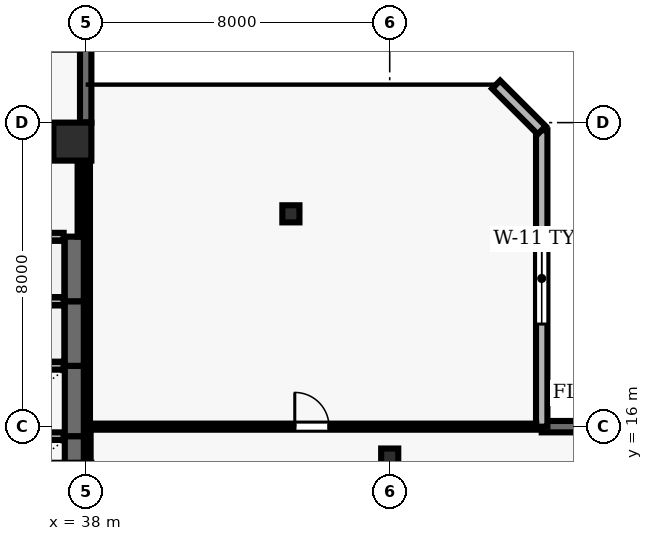
"""IFC4 building model, lengths in metres.
Left out: names, types, materials, properties, quantities, classifications, styles, units other than length and angle.
Written with IfcOpenShell. Run it as: python <this file> out.ifc"""

import sys

from ifc_helpers import new_model, si_unit, direction, frame, frame_2d, origin, origin_2d, place, context, subcontext, project, spatial, rectangle, hollow_rectangle, extrude, element, fill, save


model = new_model("IFC4")
c1 = context("Model", 3, precision=1e-05, world=origin(), true_north=direction((0.0, 1.0)))
c2 = subcontext(c1, "Body", "Model", "MODEL_VIEW")
j1 = project(units=[si_unit("LENGTHUNIT", "METRE"), si_unit("PLANEANGLEUNIT", "RADIAN")], contexts=[c1])
p1 = place(None, origin())
s1 = spatial("IfcSite", under=j1, at=p1, CompositionType="ELEMENT")
p2 = place(p1, origin())
s2 = spatial("IfcBuilding", under=s1, at=p2, CompositionType="ELEMENT")
p3 = place(p2, frame((0.0, 0.0, 170.8)))
s3 = spatial("IfcBuildingStorey", under=s2, at=p3, CompositionType="ELEMENT", Elevation=170.8)
p4 = place(p3, frame((37.65, 23.5, 0.0), z_axis=(0.0, 0.0, 1.0), x_axis=(1.0, 0.0, 0.0)))
e1 = element("IfcColumn", 1, at=p4, inside=s3, PredefinedType="COLUMN", context=c2, shape_type="SweptSolid", body=[
    extrude(rectangle(XDim=1.0, YDim=1.0, at=origin_2d()), origin(), (0.0, 0.0, 1.0), 5.0),
])
for number, where, z_axis, x_axis in (
    (2, (46.0, 15.2, 0.0), (0.0, 0.0, 1.0), (1.0, 0.0, 0.0)),
    (3, (43.4, 21.6, 0.0), (0.0, 0.0, 1.0), (1.0, 0.0, 0.0)),
):
    element("IfcColumn", number, at=place(p3, frame(where, z_axis=z_axis, x_axis=x_axis)), inside=s3, PredefinedType="COLUMN", context=c2, shape_type="SweptSolid", body=[
        extrude(hollow_rectangle(XDim=0.45, YDim=0.45, WallThickness=0.02, at=origin_2d()), origin(), (0.0, 0.0, 1.0), 5.0),
    ])
p5 = place(p3, frame((62.7, 16.0, 0.0), z_axis=(0.0, 0.0, 1.0), x_axis=(-1.0, 0.0, 0.0)))
e4 = element("IfcWall", 4, at=p5, inside=s3, PredefinedType="SOLIDWALL", context=c2, shape_type="SweptSolid", body=[
    extrude(rectangle(XDim=12.7, YDim=0.3, at=frame_2d((6.35, 0.0))), origin(), (0.0, 0.0, 1.0), 4.79),
])
p6 = place(p5, frame((6.85, 0.0, 0.0)))
e5 = element("IfcOpeningElement", 5, at=p6, cuts=e4, PredefinedType="OPENING", context=c2, shape_type="SweptSolid", body=[
    extrude(rectangle(XDim=1.0, YDim=2.2, at=frame_2d((0.5, 1.1))), frame((0.0, 0.16, 0.0), z_axis=(0.0, -1.0, 0.0), x_axis=(1.0, 0.0, 0.0)), (0.0, 0.0, 1.0), 0.32),
])
p7 = place(p5, frame((2.275, 0.0, 0.9)))
e6 = element("IfcOpeningElement", 6, at=p7, cuts=e4, PredefinedType="OPENING", context=c2, shape_type="SweptSolid", body=[
    extrude(rectangle(XDim=1.8, YDim=2.2, at=frame_2d((0.9, 1.1))), frame((0.0, 0.16, 0.0), z_axis=(0.0, -1.0, 0.0), x_axis=(1.0, 0.0, 0.0)), (0.0, 0.0, 1.0), 0.32),
])
p8 = place(p3, frame((50.0, 16.0, 0.0), z_axis=(0.0, 0.0, 1.0), x_axis=(0.0, 1.0, 0.0)))
e7 = element("IfcWall", 7, at=p8, inside=s3, PredefinedType="SOLIDWALL", context=c2, shape_type="SweptSolid", body=[
    extrude(rectangle(XDim=7.8, YDim=0.3, at=frame_2d((3.9, 0.0))), origin(), (0.0, 0.0, 1.0), 4.79),
])
p9 = place(p8, frame((2.7, 0.0, 0.9)))
e8 = element("IfcOpeningElement", 8, at=p9, cuts=e7, PredefinedType="OPENING", context=c2, shape_type="SweptSolid", body=[
    extrude(rectangle(XDim=2.4, YDim=2.2, at=frame_2d((1.2, 1.1))), frame((0.0, 0.16, 0.0), z_axis=(0.0, -1.0, 0.0), x_axis=(1.0, 0.0, 0.0)), (0.0, 0.0, 1.0), 0.32),
])
p10 = place(p3, frame((50.0, 23.8, 0.0), z_axis=(0.0, 0.0, 1.0), x_axis=(-0.707106781187, 0.707106781187, 0.0)))
e9 = element("IfcWall", 9, at=p10, inside=s3, PredefinedType="SOLIDWALL", context=c2, shape_type="SweptSolid", body=[
    extrude(rectangle(XDim=1.697, YDim=0.3, at=frame_2d((0.849, 0.0))), origin(), (0.0, 0.0, 1.0), 4.79),
])
p11 = place(p3, frame((38.0, 24.0, 0.0), z_axis=(0.0, 0.0, 1.0), x_axis=(0.0, 1.0, 0.0)))
e10 = element("IfcWall", 10, at=p11, inside=s3, PredefinedType="SOLIDWALL", context=c2, shape_type="SweptSolid", body=[
    extrude(rectangle(XDim=16.7, YDim=0.3, at=frame_2d((8.35, 0.0))), origin(), (0.0, 0.0, 1.0), 4.79),
])
p12 = place(p11, frame((7.45, 0.0, 0.0)))
e11 = element("IfcOpeningElement", 11, at=p12, cuts=e10, PredefinedType="OPENING", context=c2, shape_type="SweptSolid", body=[
    extrude(rectangle(XDim=1.0, YDim=2.2, at=frame_2d((0.5, 1.1))), frame((0.0, 0.16, 0.0), z_axis=(0.0, -1.0, 0.0), x_axis=(1.0, 0.0, 0.0)), (0.0, 0.0, 1.0), 0.32),
])
p13 = place(p11, frame((2.725, 0.0, 0.9)))
e12 = element("IfcOpeningElement", 12, at=p13, cuts=e10, PredefinedType="OPENING", context=c2, shape_type="SweptSolid", body=[
    extrude(rectangle(XDim=1.5, YDim=1.6, at=frame_2d((0.75, 0.8))), frame((0.0, 0.16, 0.0), z_axis=(0.0, -1.0, 0.0), x_axis=(1.0, 0.0, 0.0)), (0.0, 0.0, 1.0), 0.32),
])
p14 = place(p11, frame((11.475, 0.0, 0.9)))
e13 = element("IfcOpeningElement", 13, at=p14, cuts=e10, PredefinedType="OPENING", context=c2, shape_type="SweptSolid", body=[
    extrude(rectangle(XDim=1.5, YDim=1.6, at=frame_2d((0.75, 0.8))), frame((0.0, 0.16, 0.0), z_axis=(0.0, -1.0, 0.0), x_axis=(1.0, 0.0, 0.0)), (0.0, 0.0, 1.0), 0.32),
])
p15 = place(p3, frame((37.7, 13.9, 0.0), z_axis=(0.0, 0.0, 1.0), x_axis=(0.0, 1.0, 0.0)))
e14 = element("IfcWall", 14, at=p15, inside=s3, PredefinedType="SHEAR", context=c2, shape_type="SweptSolid", body=[
    extrude(rectangle(XDim=1.85, YDim=0.5, at=frame_2d((0.925, 0.0))), origin(), (0.0, 0.0, 1.0), 4.79),
])
p16 = place(p3, frame((37.42, 15.75, 0.0), z_axis=(0.0, 0.0, 1.0), x_axis=(-1.0, 0.0, 0.0)))
e15 = element("IfcWall", 15, at=p16, inside=s3, PredefinedType="SOLIDWALL", context=c2, shape_type="SweptSolid", body=[
    extrude(rectangle(XDim=2.14, YDim=0.2, at=frame_2d((1.07, 0.0))), origin(), (0.0, 0.0, 1.0), 4.79),
])
p17 = place(p3, frame((37.7, 15.75, 0.0), z_axis=(0.0, 0.0, 1.0), x_axis=(0.0, 1.0, 0.0)))
e16 = element("IfcWall", 16, at=p17, inside=s3, PredefinedType="SHEAR", context=c2, shape_type="SweptSolid", body=[
    extrude(rectangle(XDim=1.85, YDim=0.5, at=frame_2d((0.925, 0.0))), origin(), (0.0, 0.0, 1.0), 4.79),
])
p18 = place(p3, frame((37.42, 17.6, 0.0), z_axis=(0.0, 0.0, 1.0), x_axis=(-1.0, 0.0, 0.0)))
e17 = element("IfcWall", 17, at=p18, inside=s3, PredefinedType="SOLIDWALL", context=c2, shape_type="SweptSolid", body=[
    extrude(rectangle(XDim=2.14, YDim=0.2, at=frame_2d((1.07, 0.0))), origin(), (0.0, 0.0, 1.0), 4.79),
])
p19 = place(p3, frame((37.7, 17.6, 0.0), z_axis=(0.0, 0.0, 1.0), x_axis=(0.0, 1.0, 0.0)))
e18 = element("IfcWall", 18, at=p19, inside=s3, PredefinedType="SHEAR", context=c2, shape_type="SweptSolid", body=[
    extrude(rectangle(XDim=1.7, YDim=0.5, at=frame_2d((0.85, 0.0))), origin(), (0.0, 0.0, 1.0), 4.79),
])
p20 = place(p3, frame((37.42, 19.3, 0.0), z_axis=(0.0, 0.0, 1.0), x_axis=(-1.0, 0.0, 0.0)))
e19 = element("IfcWall", 19, at=p20, inside=s3, PredefinedType="SOLIDWALL", context=c2, shape_type="SweptSolid", body=[
    extrude(rectangle(XDim=2.14, YDim=0.2, at=frame_2d((1.07, 0.0))), origin(), (0.0, 0.0, 1.0), 4.79),
])
p21 = place(p3, frame((37.7, 19.3, 0.0), z_axis=(0.0, 0.0, 1.0), x_axis=(0.0, 1.0, 0.0)))
e20 = element("IfcWall", 20, at=p21, inside=s3, PredefinedType="SHEAR", context=c2, shape_type="SweptSolid", body=[
    extrude(rectangle(XDim=1.7, YDim=0.5, at=frame_2d((0.85, 0.0))), origin(), (0.0, 0.0, 1.0), 4.79),
])
p22 = place(p3, frame((37.42, 21.0, 0.0), z_axis=(0.0, 0.0, 1.0), x_axis=(-1.0, 0.0, 0.0)))
e21 = element("IfcWall", 21, at=p22, inside=s3, PredefinedType="SOLIDWALL", context=c2, shape_type="SweptSolid", body=[
    extrude(rectangle(XDim=2.14, YDim=0.2, at=frame_2d((1.07, 0.0))), origin(), (0.0, 0.0, 1.0), 4.79),
])
p23 = place(p3, frame((37.85, 23.85, 0.0), z_axis=(0.0, 0.0, 1.0), x_axis=(-1.0, 0.0, 0.0)))
e22 = element("IfcWall", 22, at=p23, inside=s3, PredefinedType="PARTITIONING", context=c2, shape_type="SweptSolid", body=[
    extrude(rectangle(XDim=4.0, YDim=0.16, at=frame_2d((2.0, 0.0))), origin(), (0.0, 0.0, 1.0), 4.246),
])
p24 = place(p23, frame((2.25, 0.0, 0.0)))
e23 = element("IfcOpeningElement", 23, at=p24, cuts=e22, PredefinedType="OPENING", context=c2, shape_type="SweptSolid", body=[
    extrude(rectangle(XDim=0.9, YDim=2.1, at=frame_2d((0.45, 1.05))), frame((0.0, 0.09, 0.0), z_axis=(0.0, -1.0, 0.0), x_axis=(1.0, 0.0, 0.0)), (0.0, 0.0, 1.0), 0.18),
])
p25 = place(p3, frame((38.05, 16.0, 0.0), z_axis=(0.0, 0.0, 1.0), x_axis=(1.0, 0.0, 0.0)))
e24 = element("IfcWall", 24, at=p25, inside=s3, PredefinedType="PARTITIONING", context=c2, shape_type="SweptSolid", body=[
    extrude(rectangle(XDim=11.805, YDim=0.16, at=frame_2d((5.902, 0.0))), origin(), (0.0, 0.0, 1.0), 4.79),
])
p26 = place(p25, frame((5.452, 0.0, 0.0)))
e25 = element("IfcOpeningElement", 25, at=p26, cuts=e24, PredefinedType="OPENING", context=c2, shape_type="SweptSolid", body=[
    extrude(rectangle(XDim=0.9, YDim=2.1, at=frame_2d((0.45, 1.05))), frame((0.0, 0.09, 0.0), z_axis=(0.0, -1.0, 0.0), x_axis=(1.0, 0.0, 0.0)), (0.0, 0.0, 1.0), 0.18),
])
p27 = place(p3, frame((37.85, 21.0, 0.0), z_axis=(0.0, 0.0, 1.0), x_axis=(0.0, 1.0, 0.0)))
e26 = element("IfcWall", 26, at=p27, inside=s3, PredefinedType="PARTITIONING", context=c2, shape_type="SweptSolid", body=[
    extrude(rectangle(XDim=2.775, YDim=0.125, at=frame_2d((1.387, 0.0))), origin(), (0.0, 0.0, 1.0), 4.246),
])
p28 = place(p3, frame((38.05, 15.925, 0.0), z_axis=(0.0, 0.0, 1.0), x_axis=(0.0, -1.0, 0.0)))
e27 = element("IfcWall", 27, at=p28, inside=s3, PredefinedType="PARTITIONING", context=c2, shape_type="SweptSolid", body=[
    extrude(rectangle(XDim=6.375, YDim=0.16, at=frame_2d((3.188, 0.0))), origin(), (0.0, 0.0, 1.0), 4.246),
])
p29 = place(p3, frame((38.05, 24.0, 0.0), z_axis=(0.0, 0.0, 1.0), x_axis=(0.0, -1.0, 0.0)))
e28 = element("IfcWall", 28, at=p29, inside=s3, PredefinedType="PARTITIONING", context=c2, shape_type="SweptSolid", body=[
    extrude(rectangle(XDim=7.925, YDim=0.125, at=frame_2d((3.962, 0.0))), origin(), (0.0, 0.0, 1.0), 4.246),
])
p30 = place(p9, origin())
e29 = element("IfcWindow", 29, at=p30, inside=s3, PartitioningType="SINGLE_PANEL", PredefinedType="WINDOW", context=c2, shape_type="SweptSolid", body=[
    extrude(rectangle(XDim=2.4, YDim=2.2, at=frame_2d((1.2, 1.1))), frame((0.0, 0.03, 0.0), z_axis=(0.0, -1.0, 0.0), x_axis=(1.0, 0.0, 0.0)), (0.0, 0.0, 1.0), 0.06),
])
fill(e8, e29)
p31 = place(p26, origin())
e30 = element("IfcDoor", 30, at=p31, inside=s3, OperationType="SINGLE_SWING_LEFT", PredefinedType="DOOR", context=c2, shape_type="SweptSolid", body=[
    extrude(rectangle(XDim=0.9, YDim=2.1, at=frame_2d((0.45, 1.05))), frame((0.0, 0.025, 0.0), z_axis=(0.0, -1.0, 0.0), x_axis=(1.0, 0.0, 0.0)), (0.0, 0.0, 1.0), 0.05),
])
fill(e25, e30)
save(model, sys.argv[1])
